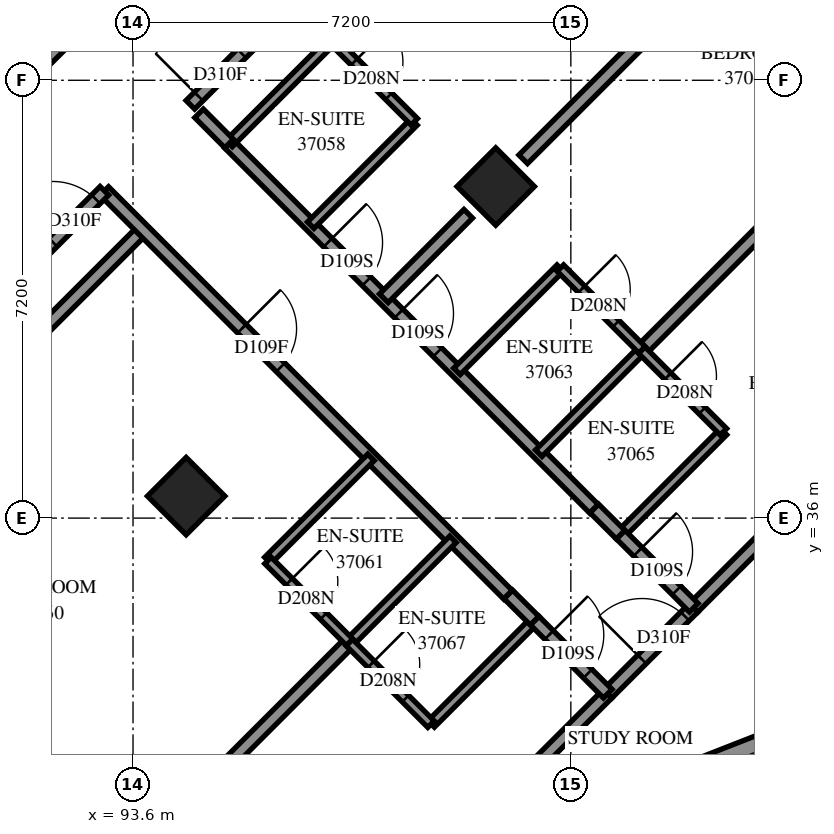
"""IFC4 building model, lengths in metres.
Left out: names, types, materials, properties, quantities, classifications, styles, units other than length and angle.
Written with IfcOpenShell. Run it as: python <this file> out.ifc"""

import sys

from ifc_helpers import new_model, si_unit, direction, frame, frame_2d, origin, origin_2d, place, context, subcontext, project, spatial, polyline, rectangle, outline, extrude, element, fill, save


model = new_model("IFC4")
c1 = context("Model", 3, precision=1e-05, world=origin(), true_north=direction((0.0, 1.0)))
c2 = subcontext(c1, "Body", "Model", "MODEL_VIEW")
j1 = project(units=[si_unit("LENGTHUNIT", "METRE"), si_unit("PLANEANGLEUNIT", "RADIAN")], contexts=[c1])
p1 = place(None, origin())
s1 = spatial("IfcSite", under=j1, at=p1, CompositionType="ELEMENT")
p2 = place(p1, origin())
s2 = spatial("IfcBuilding", under=s1, at=p2, CompositionType="ELEMENT")
p3 = place(p2, frame((0.0, 0.0, 138.8)))
s3 = spatial("IfcBuildingStorey", under=s2, at=p3, CompositionType="ELEMENT", Elevation=138.8)
for number, where, z_axis, x_axis in (
    (1, (99.565, 41.453, 0.0), (0.0, 0.0, 1.0), (0.707, -0.707, 0.0)),
    (2, (94.474, 36.362, 0.0), (0.0, 0.0, 1.0), (0.707, -0.707, 0.0)),
):
    element("IfcColumn", number, at=place(p3, frame(where, z_axis=z_axis, x_axis=x_axis)), inside=s3, PredefinedType="COLUMN", context=c2, shape_type="SweptSolid", body=[
        extrude(rectangle(XDim=0.9, YDim=0.9, at=origin_2d()), origin(), (0.0, 0.0, 1.0), 3.1),
    ])
p4 = place(p3, frame((87.049, 38.695, -0.3), z_axis=(0.0, 0.0, 1.0), x_axis=(0.7071067812, 0.7071067812, 0.0)))
e3 = element("IfcWall", 3, at=p4, inside=s3, PredefinedType="SHEAR", context=c2, shape_type="SweptSolid", body=[
    extrude(rectangle(XDim=14.4, YDim=0.6, at=frame_2d((7.2, 0.0))), origin(), (0.0, 0.0, 1.0), 2.7),
])
p5 = place(p4, frame((4.55, 0.0, 0.3)))
e4 = element("IfcOpeningElement", 4, at=p5, cuts=e3, PredefinedType="OPENING", context=c2, shape_type="SweptSolid", body=[
    extrude(rectangle(XDim=1.1, YDim=2.1, at=frame_2d((0.55, 1.05))), frame((0.0, 0.31, 0.0), z_axis=(0.0, -1.0, 0.0), x_axis=(1.0, 0.0, 0.0)), (0.0, 0.0, 1.0), 0.62),
])
p6 = place(p4, frame((11.35, 0.0, 0.3)))
e5 = element("IfcOpeningElement", 5, at=p6, cuts=e3, PredefinedType="OPENING", context=c2, shape_type="SweptSolid", body=[
    extrude(rectangle(XDim=1.1, YDim=2.1, at=frame_2d((0.55, 1.05))), frame((0.0, 0.31, 0.0), z_axis=(0.0, -1.0, 0.0), x_axis=(1.0, 0.0, 0.0)), (0.0, 0.0, 1.0), 0.62),
])
p7 = place(p3, frame((100.881, 30.993, 0.0), z_axis=(0.0, 0.0, 1.0), x_axis=(0.9311443392, 0.3646508186, 0.0)))
e6 = element("IfcWall", 6, at=p7, inside=s3, PredefinedType="SOLIDWALL", context=c2, shape_type="SweptSolid", body=[
    extrude(outline(polyline([(0.109, -0.25), (5.602, -0.25), (5.373, 0.25), (-0.109, 0.25), (0.109, -0.25)])), origin(), (0.0, 0.0, 1.0), 3.1),
])
p8 = place(p7, frame((0.589, 0.0, 0.45)))
e7 = element("IfcOpeningElement", 7, at=p8, cuts=e6, PredefinedType="OPENING", context=c2, shape_type="SweptSolid", body=[
    extrude(rectangle(XDim=2.8, YDim=2.5, at=frame_2d((1.4, 1.25))), frame((0.0, 0.26, 0.0), z_axis=(0.0, -1.0, 0.0), x_axis=(1.0, 0.0, 0.0)), (0.0, 0.0, 1.0), 0.52),
])
p9 = place(p3, frame((86.331, 33.312, 0.0), z_axis=(0.0, 0.0, 1.0), x_axis=(0.7071067812, 0.7071067812, 0.0)))
e8 = element("IfcWall", 8, at=p9, inside=s3, PredefinedType="PARTITIONING", context=c2, shape_type="SweptSolid", body=[
    extrude(rectangle(XDim=10.514, YDim=0.2, at=frame_2d((5.257, 0.0))), origin(), (0.0, 0.0, 1.0), 3.1),
])
p10 = place(p3, frame((93.127, 41.379, 0.0), z_axis=(0.0, 0.0, 1.0), x_axis=(0.7071067812, -0.7071067812, 0.0)))
e9 = element("IfcWall", 9, at=p10, inside=s3, PredefinedType="PARTITIONING", context=c2, shape_type="SweptSolid", body=[
    extrude(rectangle(XDim=9.39, YDim=0.2, at=frame_2d((4.695, 0.0))), origin(), (0.0, 0.0, 1.0), 3.1),
])
p11 = place(p10, frame((3.2, 0.0, 0.0)))
e10 = element("IfcOpeningElement", 10, at=p11, cuts=e9, PredefinedType="OPENING", context=c2, shape_type="SweptSolid", body=[
    extrude(rectangle(XDim=0.9, YDim=2.1, at=frame_2d((0.45, 1.05))), frame((0.0, 0.11, 0.0), z_axis=(0.0, -1.0, 0.0), x_axis=(1.0, 0.0, 0.0)), (0.0, 0.0, 1.0), 0.22),
])
p12 = place(p3, frame((94.543, 42.797, 0.0), z_axis=(0.0, 0.0, 1.0), x_axis=(0.7071067812, 0.7071067812, 0.0)))
e11 = element("IfcWall", 11, at=p12, inside=s3, PredefinedType="PARTITIONING", context=c2, shape_type="SweptSolid", body=[
    extrude(rectangle(XDim=8.901, YDim=0.2, at=frame_2d((4.45, 0.0))), origin(), (0.0, 0.0, 1.0), 3.1),
])
p13 = place(p12, frame((0.193, 0.0, 0.0)))
e12 = element("IfcOpeningElement", 12, at=p13, cuts=e11, PredefinedType="OPENING", context=c2, shape_type="SweptSolid", body=[
    extrude(rectangle(XDim=1.0, YDim=2.1, at=frame_2d((0.5, 1.05))), frame((0.0, 0.11, 0.0), z_axis=(0.0, -1.0, 0.0), x_axis=(1.0, 0.0, 0.0)), (0.0, 0.0, 1.0), 0.22),
])
p14 = place(p3, frame((86.837, 35.091, 0.0), z_axis=(0.0, 0.0, 1.0), x_axis=(0.7071067812, 0.7071067812, 0.0)))
e13 = element("IfcWall", 13, at=p14, inside=s3, PredefinedType="PARTITIONING", context=c2, shape_type="SweptSolid", body=[
    extrude(rectangle(XDim=8.898, YDim=0.2, at=frame_2d((4.449, 0.0))), origin(), (0.0, 0.0, 1.0), 3.1),
])
p15 = place(p14, frame((7.7, 0.0, 0.0)))
e14 = element("IfcOpeningElement", 14, at=p15, cuts=e13, PredefinedType="OPENING", context=c2, shape_type="SweptSolid", body=[
    extrude(rectangle(XDim=1.0, YDim=2.1, at=frame_2d((0.5, 1.05))), frame((0.0, 0.11, 0.0), z_axis=(0.0, -1.0, 0.0), x_axis=(1.0, 0.0, 0.0)), (0.0, 0.0, 1.0), 0.22),
])
p16 = place(p3, frame((95.177, 42.157, 0.0), z_axis=(0.0, 0.0, 1.0), x_axis=(0.7071067812, -0.7071067812, 0.0)))
e15 = element("IfcWall", 15, at=p16, inside=s3, PredefinedType="PARTITIONING", context=c2, shape_type="SweptSolid", body=[
    extrude(rectangle(XDim=8.491, YDim=0.2, at=frame_2d((4.245, 0.0))), origin(), (0.0, 0.0, 1.0), 3.1),
])
p17 = place(p16, frame((2.3, 0.0, 0.0)))
e16 = element("IfcOpeningElement", 16, at=p17, cuts=e15, PredefinedType="OPENING", context=c2, shape_type="SweptSolid", body=[
    extrude(rectangle(XDim=0.9, YDim=2.1, at=frame_2d((0.45, 1.05))), frame((0.0, 0.11, 0.0), z_axis=(0.0, -1.0, 0.0), x_axis=(1.0, 0.0, 0.0)), (0.0, 0.0, 1.0), 0.22),
])
p18 = place(p16, frame((3.95, 0.0, 0.0)))
e17 = element("IfcOpeningElement", 17, at=p18, cuts=e15, PredefinedType="OPENING", context=c2, shape_type="SweptSolid", body=[
    extrude(rectangle(XDim=0.9, YDim=2.1, at=frame_2d((0.45, 1.05))), frame((0.0, 0.11, 0.0), z_axis=(0.0, -1.0, 0.0), x_axis=(1.0, 0.0, 0.0)), (0.0, 0.0, 1.0), 0.22),
])
p19 = place(p3, frame((91.391, 28.19, 0.0), z_axis=(0.0, 0.0, 1.0), x_axis=(0.7071067812, 0.7071067812, 0.0)))
e18 = element("IfcWall", 18, at=p19, inside=s3, PredefinedType="PARTITIONING", context=c2, shape_type="SweptSolid", body=[
    extrude(rectangle(XDim=8.158, YDim=0.2, at=frame_2d((4.079, 0.0))), origin(), (0.0, 0.0, 1.0), 3.1),
])
p20 = place(p3, frame((100.017, 41.901, 0.0), z_axis=(0.0, 0.0, 1.0), x_axis=(0.7072754814, 0.7069380408, 0.0)))
e19 = element("IfcWall", 19, at=p20, inside=s3, PredefinedType="PARTITIONING", context=c2, shape_type="SweptSolid", body=[
    extrude(rectangle(XDim=5.927, YDim=0.2, at=frame_2d((2.963, 0.0))), origin(), (0.0, 0.0, 1.0), 3.1),
])
p21 = place(p3, frame((101.968, 38.766, 0.0), z_axis=(0.0, 0.0, 1.0), x_axis=(0.7071067812, 0.7071067812, 0.0)))
e20 = element("IfcWall", 20, at=p21, inside=s3, PredefinedType="PARTITIONING", context=c2, shape_type="SweptSolid", body=[
    extrude(rectangle(XDim=3.3, YDim=0.2, at=frame_2d((1.65, 0.0))), origin(), (0.0, 0.0, 1.0), 3.1),
])
for number, where, z_axis, x_axis in (
    (21, (96.523, 40.817, 0.0), (0.0, 0.0, 1.0), (0.707, 0.707, 0.0)),
    (22, (98.927, 38.413, 0.0), (0.0, 0.0, 1.0), (0.707, 0.707, 0.0)),
    (23, (98.503, 32.615, 0.0), (0.0, 0.0, 1.0), (0.707, 0.707, 0.0)),
    (24, (95.179, 42.161, 0.0), (0.0, 0.0, 1.0), (0.707, 0.707, 0.0)),
):
    element("IfcWall", number, at=place(p3, frame(where, z_axis=z_axis, x_axis=x_axis)), inside=s3, PredefinedType="PARTITIONING", context=c2, shape_type="SweptSolid", body=[
        extrude(rectangle(XDim=2.401, YDim=0.15, at=frame_2d((1.201, 0.0))), origin(), (0.0, 0.0, 1.0), 3.1),
    ])
for number, where, z_axis, x_axis in (
    (25, (97.163, 33.955, 0.0), (0.0, 0.0, 1.0), (0.708, 0.707, 0.0)),
    (26, (100.273, 37.067, 0.0), (0.0, 0.0, 1.0), (0.707, 0.708, 0.0)),
):
    element("IfcWall", number, at=place(p3, frame(where, z_axis=z_axis, x_axis=x_axis)), inside=s3, PredefinedType="PARTITIONING", context=c2, shape_type="SweptSolid", body=[
        extrude(rectangle(XDim=2.4, YDim=0.15, at=frame_2d((1.2, 0.0))), origin(), (0.0, 0.0, 1.0), 3.1),
    ])
for number, where, z_axis, x_axis in (
    (27, (95.817, 35.303, 0.0), (0.0, 0.0, 1.0), (0.707, 0.707, 0.0)),
    (28, (101.615, 35.727, 0.0), (0.0, 0.0, 1.0), (0.707, 0.707, 0.0)),
):
    element("IfcWall", number, at=place(p3, frame(where, z_axis=z_axis, x_axis=x_axis)), inside=s3, PredefinedType="PARTITIONING", context=c2, shape_type="SweptSolid", body=[
        extrude(rectangle(XDim=2.398, YDim=0.15, at=frame_2d((1.199, 0.0))), origin(), (0.0, 0.0, 1.0), 3.1),
    ])
p22 = place(p3, frame((101.403, 33.111, 0.0), z_axis=(0.0, 0.0, 1.0), x_axis=(0.7071067812, 0.7071067812, 0.0)))
e29 = element("IfcWall", 29, at=p22, inside=s3, PredefinedType="PARTITIONING", context=c2, shape_type="SweptSolid", body=[
    extrude(rectangle(XDim=2.0, YDim=0.2, at=frame_2d((1.0, 0.0))), origin(), (0.0, 0.0, 1.0), 2.6),
])
p23 = place(p22, frame((0.802, 0.0, 0.0)))
e30 = element("IfcOpeningElement", 30, at=p23, cuts=e29, PredefinedType="OPENING", context=c2, shape_type="SweptSolid", body=[
    extrude(rectangle(XDim=1.0, YDim=2.1, at=frame_2d((0.5, 1.05))), frame((0.0, 0.11, 0.0), z_axis=(0.0, -1.0, 0.0), x_axis=(1.0, 0.0, 0.0)), (0.0, 0.0, 1.0), 0.22),
])
p24 = place(p3, frame((100.013, 31.721, 0.0), z_axis=(0.0, 0.0, 1.0), x_axis=(0.7071067812, 0.7071067812, 0.0)))
e31 = element("IfcWall", 31, at=p24, inside=s3, PredefinedType="PARTITIONING", context=c2, shape_type="SweptSolid", body=[
    extrude(rectangle(XDim=1.966, YDim=0.2, at=frame_2d((0.983, 0.0))), origin(), (0.0, 0.0, 1.0), 2.6),
])
p25 = place(p3, frame((97.725, 39.615, 0.0), z_axis=(0.0, 0.0, 1.0), x_axis=(0.7065975219, 0.707615674, 0.0)))
e32 = element("IfcWall", 32, at=p25, inside=s3, PredefinedType="PARTITIONING", context=c2, shape_type="SweptSolid", body=[
    extrude(rectangle(XDim=1.964, YDim=0.2, at=frame_2d((0.982, 0.0))), origin(), (0.0, 0.0, 1.0), 3.1),
])
p26 = place(p3, frame((102.817, 34.525, 0.0), z_axis=(0.0, 0.0, 1.0), x_axis=(0.7071067812, 0.7071067812, 0.0)))
e33 = element("IfcWall", 33, at=p26, inside=s3, PredefinedType="PARTITIONING", context=c2, shape_type="SweptSolid", body=[
    extrude(rectangle(XDim=1.963, YDim=0.2, at=frame_2d((0.982, 0.0))), origin(), (0.0, 0.0, 1.0), 2.6),
])
p27 = place(p3, frame((97.157, 33.955, 0.0), z_axis=(0.0, 0.0, 1.0), x_axis=(0.7071067812, -0.7071067812, 0.0)))
e34 = element("IfcWall", 34, at=p27, inside=s3, PredefinedType="PARTITIONING", context=c2, shape_type="SweptSolid", body=[
    extrude(rectangle(XDim=1.901, YDim=0.15, at=frame_2d((0.95, 0.0))), origin(), (0.0, 0.0, 1.0), 3.1),
])
p28 = place(p27, frame((0.506, 0.0, 0.0)))
e35 = element("IfcOpeningElement", 35, at=p28, cuts=e34, PredefinedType="OPENING", context=c2, shape_type="SweptSolid", body=[
    extrude(rectangle(XDim=0.8, YDim=2.1, at=frame_2d((0.4, 1.05))), frame((0.0, 0.085, 0.0), z_axis=(0.0, -1.0, 0.0), x_axis=(1.0, 0.0, 0.0)), (0.0, 0.0, 1.0), 0.17),
])
p29 = place(p3, frame((96.881, 43.861, 0.0), z_axis=(0.0, 0.0, 1.0), x_axis=(0.7071067812, -0.7071067812, 0.0)))
e36 = element("IfcWall", 36, at=p29, inside=s3, PredefinedType="PARTITIONING", context=c2, shape_type="SweptSolid", body=[
    extrude(rectangle(XDim=1.901, YDim=0.15, at=frame_2d((0.95, 0.0))), origin(), (0.0, 0.0, 1.0), 3.1),
])
p30 = place(p29, frame((0.505, 0.0, 0.0)))
e37 = element("IfcOpeningElement", 37, at=p30, cuts=e36, PredefinedType="OPENING", context=c2, shape_type="SweptSolid", body=[
    extrude(rectangle(XDim=0.8, YDim=2.1, at=frame_2d((0.4, 1.05))), frame((0.0, 0.085, 0.0), z_axis=(0.0, -1.0, 0.0), x_axis=(1.0, 0.0, 0.0)), (0.0, 0.0, 1.0), 0.17),
])
p31 = place(p3, frame((101.965, 38.763, 0.0), z_axis=(0.0, 0.0, 1.0), x_axis=(0.7071067812, -0.7071067812, 0.0)))
e38 = element("IfcWall", 38, at=p31, inside=s3, PredefinedType="PARTITIONING", context=c2, shape_type="SweptSolid", body=[
    extrude(rectangle(XDim=1.901, YDim=0.15, at=frame_2d((0.95, 0.0))), origin(), (0.0, 0.0, 1.0), 3.1),
])
p32 = place(p31, frame((0.608, 0.0, 0.0)))
e39 = element("IfcOpeningElement", 39, at=p32, cuts=e38, PredefinedType="OPENING", context=c2, shape_type="SweptSolid", body=[
    extrude(rectangle(XDim=0.8, YDim=2.1, at=frame_2d((0.4, 1.05))), frame((0.0, 0.085, 0.0), z_axis=(0.0, -1.0, 0.0), x_axis=(1.0, 0.0, 0.0)), (0.0, 0.0, 1.0), 0.17),
])
p33 = place(p3, frame((100.628, 40.112, 0.0), z_axis=(0.0, 0.0, 1.0), x_axis=(0.7065800724, -0.7076330979, 0.0)))
e40 = element("IfcWall", 40, at=p33, inside=s3, PredefinedType="PARTITIONING", context=c2, shape_type="SweptSolid", body=[
    extrude(rectangle(XDim=1.899, YDim=0.15, at=frame_2d((0.95, 0.0))), origin(), (0.0, 0.0, 1.0), 3.1),
])
p34 = place(p33, frame((0.493, 0.0, 0.0)))
e41 = element("IfcOpeningElement", 41, at=p34, cuts=e40, PredefinedType="OPENING", context=c2, shape_type="SweptSolid", body=[
    extrude(rectangle(XDim=0.8, YDim=2.1, at=frame_2d((0.4, 1.05))), frame((0.0, 0.085, 0.0), z_axis=(0.0, -1.0, 0.0), x_axis=(1.0, 0.0, 0.0)), (0.0, 0.0, 1.0), 0.17),
])
p35 = place(p3, frame((95.82, 35.304, 0.0), z_axis=(0.0, 0.0, 1.0), x_axis=(0.7065800724, -0.7076330979, 0.0)))
e42 = element("IfcWall", 42, at=p35, inside=s3, PredefinedType="PARTITIONING", context=c2, shape_type="SweptSolid", body=[
    extrude(rectangle(XDim=1.899, YDim=0.15, at=frame_2d((0.95, 0.0))), origin(), (0.0, 0.0, 1.0), 3.1),
])
p36 = place(p35, frame((0.493, 0.0, 0.0)))
e43 = element("IfcOpeningElement", 43, at=p36, cuts=e42, PredefinedType="OPENING", context=c2, shape_type="SweptSolid", body=[
    extrude(rectangle(XDim=0.8, YDim=2.1, at=frame_2d((0.4, 1.05))), frame((0.0, 0.085, 0.0), z_axis=(0.0, -1.0, 0.0), x_axis=(1.0, 0.0, 0.0)), (0.0, 0.0, 1.0), 0.17),
])
p37 = place(p3, frame((100.205, 34.315, 0.0), z_axis=(0.0, 0.0, 1.0), x_axis=(0.7071067812, -0.7071067812, 0.0)))
e44 = element("IfcWall", 44, at=p37, inside=s3, PredefinedType="PARTITIONING", context=c2, shape_type="SweptSolid", body=[
    extrude(rectangle(XDim=1.7, YDim=0.2, at=frame_2d((0.85, 0.0))), origin(), (0.0, 0.0, 1.0), 3.1),
])
p38 = place(p37, frame((0.335, 0.0, 0.0)))
e45 = element("IfcOpeningElement", 45, at=p38, cuts=e44, PredefinedType="OPENING", context=c2, shape_type="SweptSolid", body=[
    extrude(rectangle(XDim=0.9, YDim=2.1, at=frame_2d((0.45, 1.05))), frame((0.0, 0.11, 0.0), z_axis=(0.0, -1.0, 0.0), x_axis=(1.0, 0.0, 0.0)), (0.0, 0.0, 1.0), 0.22),
])
p39 = place(p3, frame((101.619, 35.729, 0.0), z_axis=(0.0, 0.0, 1.0), x_axis=(0.7071067812, -0.7071067812, 0.0)))
e46 = element("IfcWall", 46, at=p39, inside=s3, PredefinedType="PARTITIONING", context=c2, shape_type="SweptSolid", body=[
    extrude(rectangle(XDim=1.7, YDim=0.2, at=frame_2d((0.85, 0.0))), origin(), (0.0, 0.0, 1.0), 3.1),
])
p40 = place(p39, frame((0.4, 0.0, 0.0)))
e47 = element("IfcOpeningElement", 47, at=p40, cuts=e46, PredefinedType="OPENING", context=c2, shape_type="SweptSolid", body=[
    extrude(rectangle(XDim=0.9, YDim=2.1, at=frame_2d((0.45, 1.05))), frame((0.0, 0.11, 0.0), z_axis=(0.0, -1.0, 0.0), x_axis=(1.0, 0.0, 0.0)), (0.0, 0.0, 1.0), 0.22),
])
p41 = place(p3, frame((94.686, 42.656, 0.0), z_axis=(0.0, 0.0, 1.0), x_axis=(0.7056768426, -0.7085338339, 0.0)))
e48 = element("IfcWall", 48, at=p41, inside=s3, PredefinedType="PARTITIONING", context=c2, shape_type="SweptSolid", body=[
    extrude(rectangle(XDim=0.7, YDim=0.2, at=frame_2d((0.35, 0.0))), origin(), (0.0, 0.0, 1.0), 3.1),
])
for number, where, z_axis, x_axis in (
    (49, (101.186, 36.158, 0.0), (0.0, 0.0, 1.0), (0.709, -0.705, 0.0)),
    (50, (99.772, 34.744, 0.0), (0.0, 0.0, 1.0), (0.709, -0.705, 0.0)),
):
    element("IfcWall", number, at=place(p3, frame(where, z_axis=z_axis, x_axis=x_axis)), inside=s3, PredefinedType="PARTITIONING", context=c2, shape_type="SweptSolid", body=[
        extrude(rectangle(XDim=0.61, YDim=0.2, at=frame_2d((0.305, 0.0))), origin(), (0.0, 0.0, 1.0), 3.1),
    ])
p42 = place(p8, origin())
e51 = element("IfcWindow", 51, at=p42, inside=s3, PartitioningType="SINGLE_PANEL", PredefinedType="WINDOW", context=c2, shape_type="SweptSolid", body=[
    extrude(rectangle(XDim=2.8, YDim=2.5, at=frame_2d((1.4, 1.25))), frame((0.0, 0.18, 0.0), z_axis=(0.0, -1.0, 0.0), x_axis=(1.0, 0.0, 0.0)), (0.0, 0.0, 1.0), 0.06),
])
fill(e7, e51)
p43 = place(p13, origin())
e52 = element("IfcDoor", 52, at=p43, inside=s3, OperationType="SINGLE_SWING_LEFT", PredefinedType="DOOR", context=c2, shape_type="SweptSolid", body=[
    extrude(rectangle(XDim=1.0, YDim=2.1, at=frame_2d((0.5, 1.05))), frame((0.0, 0.025, 0.0), z_axis=(0.0, -1.0, 0.0), x_axis=(1.0, 0.0, 0.0)), (0.0, 0.0, 1.0), 0.05),
])
fill(e12, e52)
p44 = place(p17, origin())
e53 = element("IfcDoor", 53, at=p44, inside=s3, OperationType="SINGLE_SWING_RIGHT", PredefinedType="DOOR", context=c2, shape_type="SweptSolid", body=[
    extrude(rectangle(XDim=0.9, YDim=2.1, at=frame_2d((0.45, 1.05))), frame((0.0, 0.025, 0.0), z_axis=(0.0, -1.0, 0.0), x_axis=(1.0, 0.0, 0.0)), (0.0, 0.0, 1.0), 0.05),
])
fill(e16, e53)
p45 = place(p30, origin())
e54 = element("IfcDoor", 54, at=p45, inside=s3, OperationType="SINGLE_SWING_RIGHT", PredefinedType="DOOR", context=c2, shape_type="SweptSolid", body=[
    extrude(rectangle(XDim=0.8, YDim=2.1, at=frame_2d((0.4, 1.05))), frame((0.0, 0.025, 0.0), z_axis=(0.0, -1.0, 0.0), x_axis=(1.0, 0.0, 0.0)), (0.0, 0.0, 1.0), 0.05),
])
fill(e37, e54)
p46 = place(p15, origin())
e55 = element("IfcDoor", 55, at=p46, inside=s3, OperationType="SINGLE_SWING_LEFT", PredefinedType="DOOR", context=c2, shape_type="SweptSolid", body=[
    extrude(rectangle(XDim=1.0, YDim=2.1, at=frame_2d((0.5, 1.05))), frame((0.0, 0.025, 0.0), z_axis=(0.0, -1.0, 0.0), x_axis=(1.0, 0.0, 0.0)), (0.0, 0.0, 1.0), 0.05),
])
fill(e14, e55)
p47 = place(p11, origin())
e56 = element("IfcDoor", 56, at=p47, inside=s3, OperationType="SINGLE_SWING_LEFT", PredefinedType="DOOR", context=c2, shape_type="SweptSolid", body=[
    extrude(rectangle(XDim=0.9, YDim=2.1, at=frame_2d((0.45, 1.05))), frame((0.0, 0.025, 0.0), z_axis=(0.0, -1.0, 0.0), x_axis=(1.0, 0.0, 0.0)), (0.0, 0.0, 1.0), 0.05),
])
fill(e10, e56)
p48 = place(p36, origin())
e57 = element("IfcDoor", 57, at=p48, inside=s3, OperationType="SINGLE_SWING_RIGHT", PredefinedType="DOOR", context=c2, shape_type="SweptSolid", body=[
    extrude(rectangle(XDim=0.8, YDim=2.1, at=frame_2d((0.4, 1.05))), frame((0.0, 0.025, 0.0), z_axis=(0.0, -1.0, 0.0), x_axis=(1.0, 0.0, 0.0)), (0.0, 0.0, 1.0), 0.05),
])
fill(e43, e57)
p49 = place(p18, origin())
e58 = element("IfcDoor", 58, at=p49, inside=s3, OperationType="SINGLE_SWING_LEFT", PredefinedType="DOOR", context=c2, shape_type="SweptSolid", body=[
    extrude(rectangle(XDim=0.9, YDim=2.1, at=frame_2d((0.45, 1.05))), frame((0.0, 0.025, 0.0), z_axis=(0.0, -1.0, 0.0), x_axis=(1.0, 0.0, 0.0)), (0.0, 0.0, 1.0), 0.05),
])
fill(e17, e58)
p50 = place(p34, origin())
e59 = element("IfcDoor", 59, at=p50, inside=s3, OperationType="SINGLE_SWING_RIGHT", PredefinedType="DOOR", context=c2, shape_type="SweptSolid", body=[
    extrude(rectangle(XDim=0.8, YDim=2.1, at=frame_2d((0.4, 1.05))), frame((0.0, 0.025, 0.0), z_axis=(0.0, -1.0, 0.0), x_axis=(1.0, 0.0, 0.0)), (0.0, 0.0, 1.0), 0.05),
])
fill(e41, e59)
p51 = place(p40, origin())
e60 = element("IfcDoor", 60, at=p51, inside=s3, OperationType="SINGLE_SWING_RIGHT", PredefinedType="DOOR", context=c2, shape_type="SweptSolid", body=[
    extrude(rectangle(XDim=0.9, YDim=2.1, at=frame_2d((0.45, 1.05))), frame((0.0, 0.025, 0.0), z_axis=(0.0, -1.0, 0.0), x_axis=(1.0, 0.0, 0.0)), (0.0, 0.0, 1.0), 0.05),
])
fill(e47, e60)
p52 = place(p32, origin())
e61 = element("IfcDoor", 61, at=p52, inside=s3, OperationType="SINGLE_SWING_RIGHT", PredefinedType="DOOR", context=c2, shape_type="SweptSolid", body=[
    extrude(rectangle(XDim=0.8, YDim=2.1, at=frame_2d((0.4, 1.05))), frame((0.0, 0.025, 0.0), z_axis=(0.0, -1.0, 0.0), x_axis=(1.0, 0.0, 0.0)), (0.0, 0.0, 1.0), 0.05),
])
fill(e39, e61)
p53 = place(p38, origin())
e62 = element("IfcDoor", 62, at=p53, inside=s3, OperationType="SINGLE_SWING_LEFT", PredefinedType="DOOR", context=c2, shape_type="SweptSolid", body=[
    extrude(rectangle(XDim=0.9, YDim=2.1, at=frame_2d((0.45, 1.05))), frame((0.0, 0.025, 0.0), z_axis=(0.0, -1.0, 0.0), x_axis=(1.0, 0.0, 0.0)), (0.0, 0.0, 1.0), 0.05),
])
fill(e45, e62)
p54 = place(p28, origin())
e63 = element("IfcDoor", 63, at=p54, inside=s3, OperationType="SINGLE_SWING_RIGHT", PredefinedType="DOOR", context=c2, shape_type="SweptSolid", body=[
    extrude(rectangle(XDim=0.8, YDim=2.1, at=frame_2d((0.4, 1.05))), frame((0.0, 0.025, 0.0), z_axis=(0.0, -1.0, 0.0), x_axis=(1.0, 0.0, 0.0)), (0.0, 0.0, 1.0), 0.05),
])
fill(e35, e63)
p55 = place(p23, origin())
e64 = element("IfcDoor", 64, at=p55, inside=s3, OperationType="SINGLE_SWING_RIGHT", PredefinedType="DOOR", context=c2, shape_type="SweptSolid", body=[
    extrude(rectangle(XDim=1.0, YDim=2.1, at=frame_2d((0.5, 1.05))), frame((0.0, 0.025, 0.0), z_axis=(0.0, -1.0, 0.0), x_axis=(1.0, 0.0, 0.0)), (0.0, 0.0, 1.0), 0.05),
])
fill(e30, e64)
save(model, sys.argv[1])
